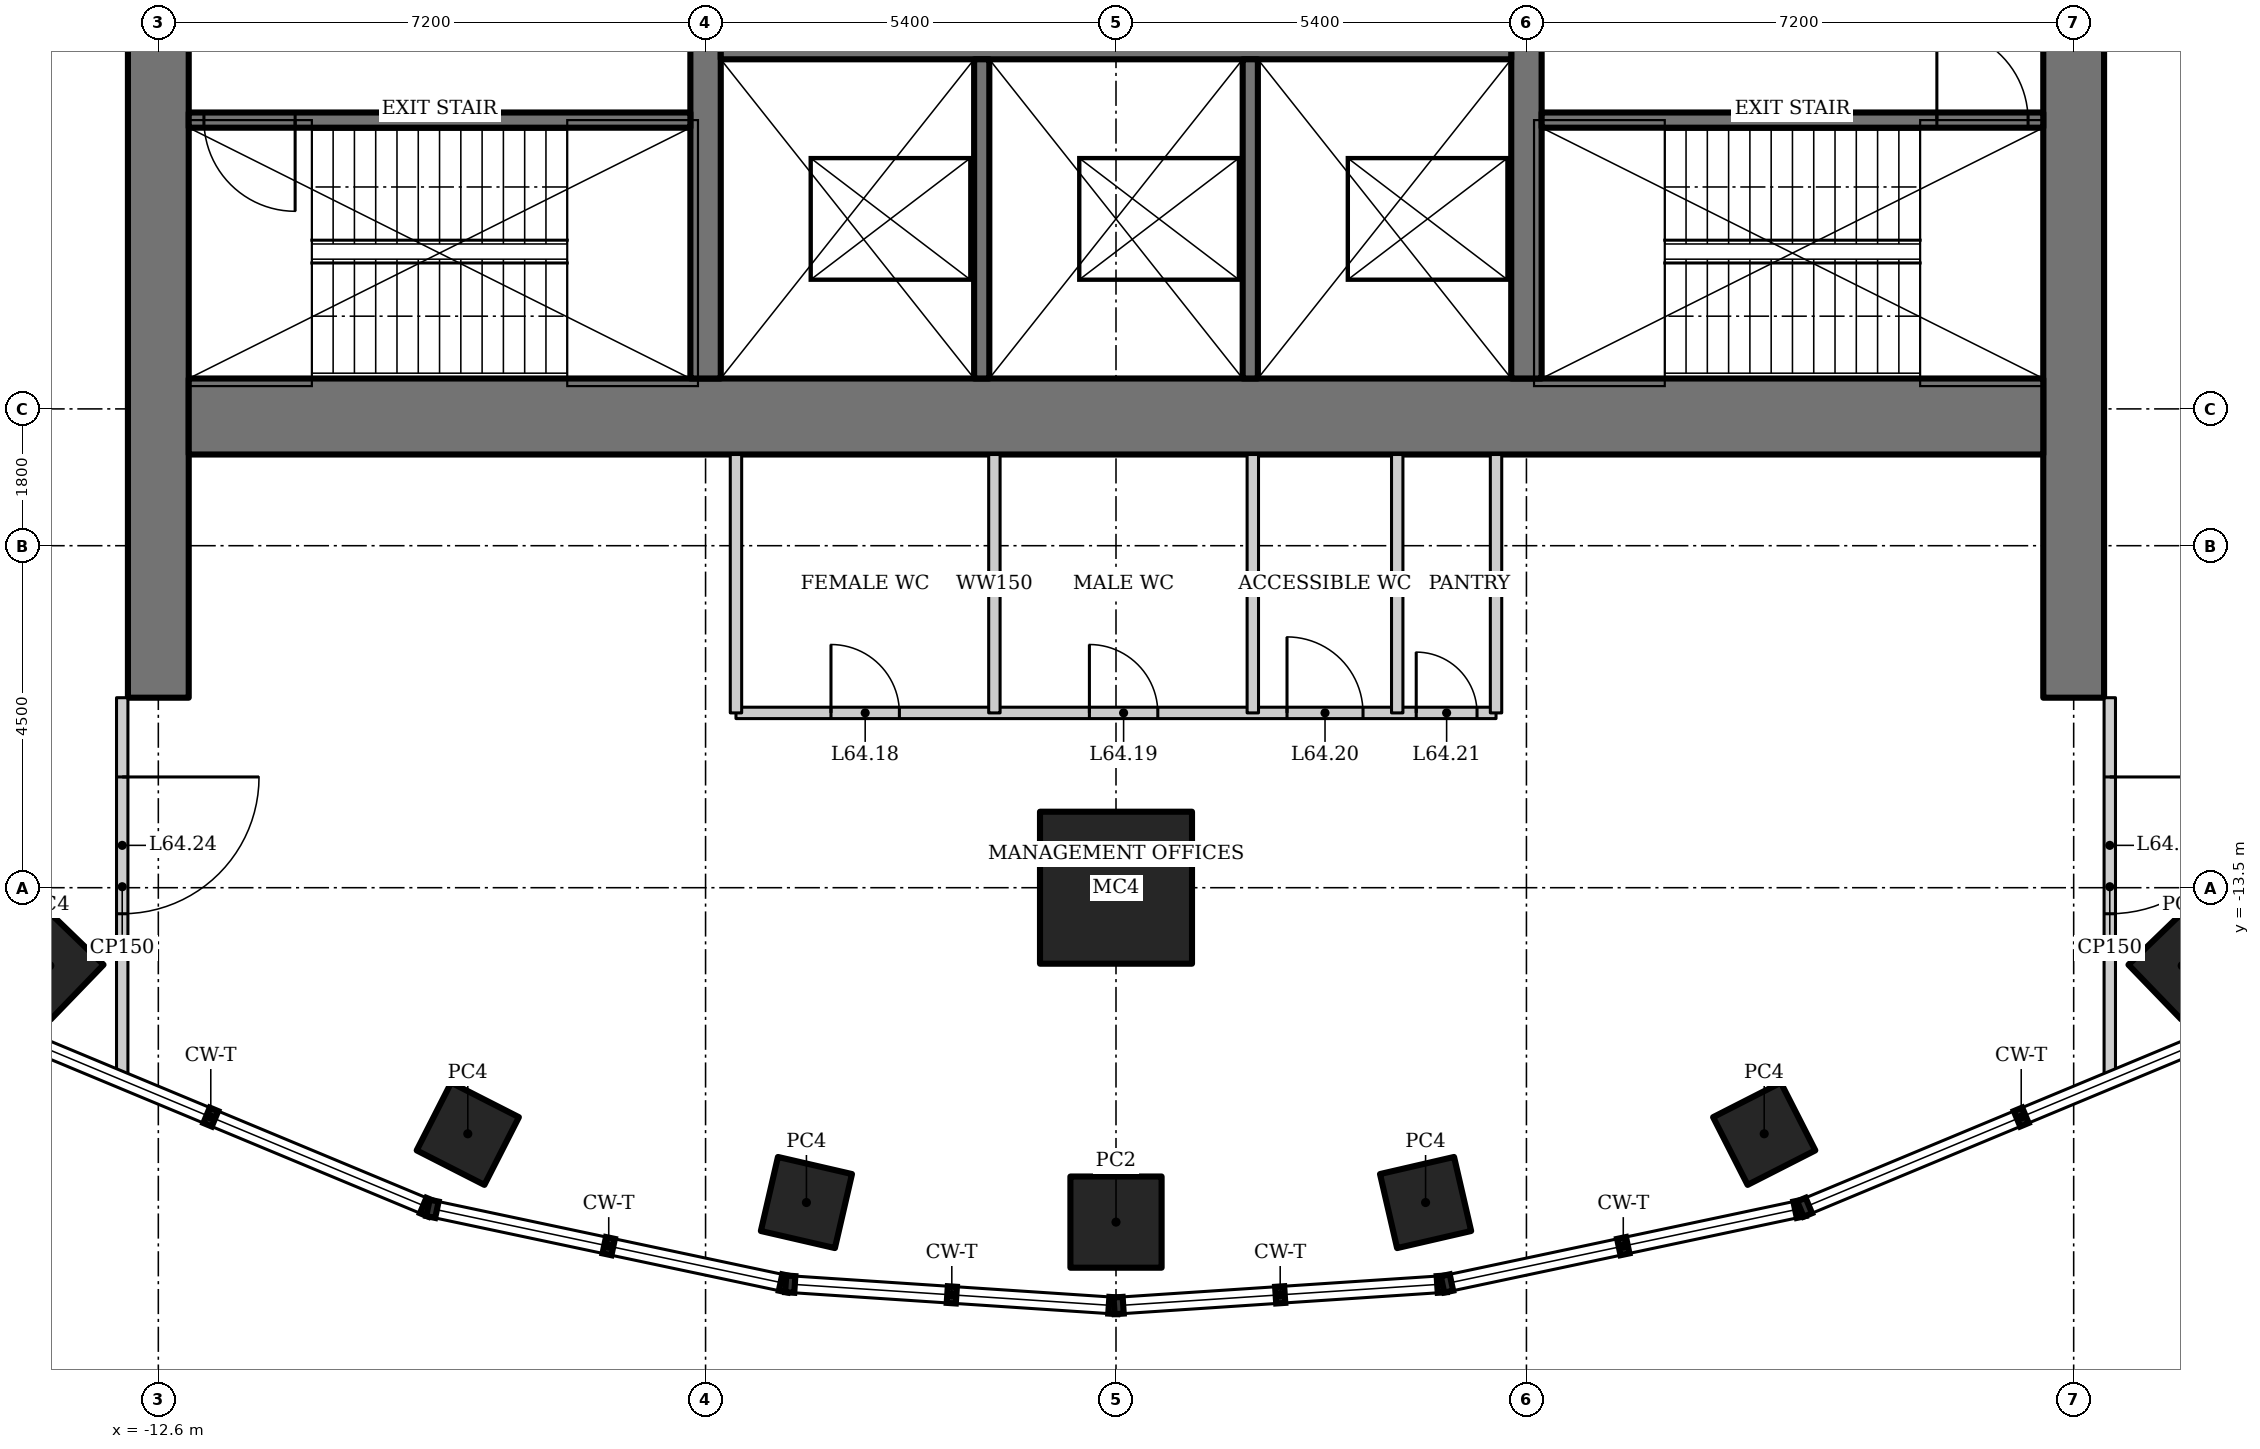
"""IFC4 building model, lengths in metres.
Left out: names, types, materials, properties, quantities, classifications, styles, units other than length and angle.
Written with IfcOpenShell. Run it as: python <this file> out.ifc"""

import sys

from ifc_helpers import new_model, si_unit, direction, frame, frame_2d, origin, origin_2d, place, context, subcontext, project, spatial, rectangle, hollow_rectangle, extrude, element, fill, save


model = new_model("IFC4")
c1 = context("Model", 3, precision=1e-05, world=origin(), true_north=direction((0.0, 1.0)))
c2 = subcontext(c1, "Body", "Model", "MODEL_VIEW")
j1 = project(units=[si_unit("LENGTHUNIT", "METRE"), si_unit("PLANEANGLEUNIT", "RADIAN")], contexts=[c1])
p1 = place(None, origin())
s1 = spatial("IfcSite", under=j1, at=p1, CompositionType="ELEMENT")
p2 = place(p1, origin())
s2 = spatial("IfcBuilding", under=s1, at=p2, CompositionType="ELEMENT")
p3 = place(p2, frame((0.0, 0.0, 274.9)))
s3 = spatial("IfcBuildingStorey", under=s2, at=p3, CompositionType="ELEMENT", Elevation=274.9)
p4 = place(p3, frame((0.0, -13.5, 0.0), z_axis=(0.0, 0.0, 1.0), x_axis=(1.0, 0.0, 0.0)))
e1 = element("IfcColumn", 1, at=p4, inside=s3, PredefinedType="COLUMN", context=c2, shape_type="SweptSolid", body=[
    extrude(hollow_rectangle(XDim=2.0, YDim=2.0, WallThickness=0.15, at=origin_2d()), origin(), (0.0, 0.0, 1.0), 4.5),
])
for number, where, z_axis, x_axis in (
    (2, (-14.028, -14.526, 0.0), (0.0, 0.0, 1.0), (0.695, 0.719, 0.0)),
    (3, (-8.528, -16.738, 0.0), (0.0, 0.0, 1.0), (0.454, 0.891, 0.0)),
    (4, (-4.073, -17.642, 0.0), (0.0, 0.0, 1.0), (0.225, 0.974, 0.0)),
):
    element("IfcColumn", number, at=place(p3, frame(where, z_axis=z_axis, x_axis=x_axis)), inside=s3, PredefinedType="COLUMN", context=c2, shape_type="SweptSolid", body=[
        extrude(hollow_rectangle(XDim=1.0, YDim=1.0, WallThickness=0.08, at=origin_2d()), origin(), (0.0, 0.0, 1.0), 4.5),
    ])
p5 = place(p3, frame((0.0, -17.9, 0.0), z_axis=(0.0, 0.0, 1.0), x_axis=(1.0, 0.0, 0.0)))
e5 = element("IfcColumn", 5, at=p5, inside=s3, PredefinedType="COLUMN", context=c2, shape_type="SweptSolid", body=[
    extrude(hollow_rectangle(XDim=1.2, YDim=1.2, WallThickness=0.1, at=origin_2d()), origin(), (0.0, 0.0, 1.0), 4.5),
])
for number, where, z_axis, x_axis in (
    (6, (4.073, -17.642, 0.0), (0.0, 0.0, 1.0), (0.974, 0.225, 0.0)),
    (7, (8.528, -16.738, 0.0), (0.0, 0.0, 1.0), (0.891, 0.454, 0.0)),
    (8, (14.028, -14.526, 0.0), (0.0, 0.0, 1.0), (0.719, 0.695, 0.0)),
):
    element("IfcColumn", number, at=place(p3, frame(where, z_axis=z_axis, x_axis=x_axis)), inside=s3, PredefinedType="COLUMN", context=c2, shape_type="SweptSolid", body=[
        extrude(hollow_rectangle(XDim=1.0, YDim=1.0, WallThickness=0.08, at=origin_2d()), origin(), (0.0, 0.0, 1.0), 4.5),
    ])
p6 = place(p3, frame((12.6, -11.0, 0.0), z_axis=(0.0, 0.0, 1.0), x_axis=(0.0, 1.0, 0.0)))
e9 = element("IfcWall", 9, at=p6, inside=s3, PredefinedType="SHEAR", context=c2, shape_type="SweptSolid", body=[
    extrude(rectangle(XDim=22.0, YDim=0.8, at=frame_2d((11.0, 0.0))), origin(), (0.0, 0.0, 1.0), 4.5),
])
p7 = place(p6, frame((10.1, 0.0, 0.0)))
e10 = element("IfcOpeningElement", 10, at=p7, cuts=e9, PredefinedType="OPENING", context=c2, shape_type="SweptSolid", body=[
    extrude(rectangle(XDim=1.8, YDim=2.1, at=frame_2d((0.9, 1.05))), frame((0.0, 0.41, 0.0), z_axis=(0.0, -1.0, 0.0), x_axis=(1.0, 0.0, 0.0)), (0.0, 0.0, 1.0), 0.82),
])
p8 = place(p3, frame((-12.6, 11.0, 0.0), z_axis=(0.0, 0.0, 1.0), x_axis=(0.0, -1.0, 0.0)))
e11 = element("IfcWall", 11, at=p8, inside=s3, PredefinedType="SHEAR", context=c2, shape_type="SweptSolid", body=[
    extrude(rectangle(XDim=22.0, YDim=0.8, at=frame_2d((11.0, 0.0))), origin(), (0.0, 0.0, 1.0), 4.5),
])
p9 = place(p8, frame((10.1, 0.0, 0.0)))
e12 = element("IfcOpeningElement", 12, at=p9, cuts=e11, PredefinedType="OPENING", context=c2, shape_type="SweptSolid", body=[
    extrude(rectangle(XDim=1.8, YDim=2.1, at=frame_2d((0.9, 1.05))), frame((0.0, 0.41, 0.0), z_axis=(0.0, -1.0, 0.0), x_axis=(1.0, 0.0, 0.0)), (0.0, 0.0, 1.0), 0.82),
])
p10 = place(p3, frame((-12.2, -7.3, 0.0), z_axis=(0.0, 0.0, 1.0), x_axis=(1.0, 0.0, 0.0)))
e13 = element("IfcWall", 13, at=p10, inside=s3, PredefinedType="SHEAR", context=c2, shape_type="SweptSolid", body=[
    extrude(rectangle(XDim=24.4, YDim=1.0, at=frame_2d((12.2, 0.0))), origin(), (0.0, 0.0, 1.0), 4.5),
])
p11 = place(p3, frame((5.4, -6.8, 0.0), z_axis=(0.0, 0.0, 1.0), x_axis=(0.0, 1.0, 0.0)))
e14 = element("IfcWall", 14, at=p11, inside=s3, PredefinedType="SHEAR", context=c2, shape_type="SweptSolid", body=[
    extrude(rectangle(XDim=14.6, YDim=0.4, at=frame_2d((7.3, 0.0))), origin(), (0.0, 0.0, 1.0), 4.5),
])
p12 = place(p11, frame((5.9, 0.0, 0.0)))
e15 = element("IfcOpeningElement", 15, at=p12, cuts=e14, PredefinedType="OPENING", context=c2, shape_type="SweptSolid", body=[
    extrude(rectangle(XDim=1.8, YDim=2.1, at=frame_2d((0.9, 1.05))), frame((0.0, 0.21, 0.0), z_axis=(0.0, -1.0, 0.0), x_axis=(1.0, 0.0, 0.0)), (0.0, 0.0, 1.0), 0.42),
])
p13 = place(p3, frame((-5.4, 7.8, 0.0), z_axis=(0.0, 0.0, 1.0), x_axis=(0.0, -1.0, 0.0)))
e16 = element("IfcWall", 16, at=p13, inside=s3, PredefinedType="SHEAR", context=c2, shape_type="SweptSolid", body=[
    extrude(rectangle(XDim=14.6, YDim=0.4, at=frame_2d((7.3, 0.0))), origin(), (0.0, 0.0, 1.0), 4.5),
])
p14 = place(p13, frame((6.4, 0.0, 0.0)))
e17 = element("IfcOpeningElement", 17, at=p14, cuts=e16, PredefinedType="OPENING", context=c2, shape_type="SweptSolid", body=[
    extrude(rectangle(XDim=1.8, YDim=2.1, at=frame_2d((0.9, 1.05))), frame((0.0, 0.21, 0.0), z_axis=(0.0, -1.0, 0.0), x_axis=(1.0, 0.0, 0.0)), (0.0, 0.0, 1.0), 0.42),
])
p15 = place(p3, frame((-5.2, -2.4, 0.0), z_axis=(0.0, 0.0, 1.0), x_axis=(1.0, 0.0, 0.0)))
e18 = element("IfcWall", 18, at=p15, inside=s3, PredefinedType="SHEAR", context=c2, shape_type="SweptSolid", body=[
    extrude(rectangle(XDim=10.4, YDim=0.4, at=frame_2d((5.2, 0.0))), origin(), (0.0, 0.0, 1.0), 4.5),
])
p16 = place(p15, frame((1.683, 0.0, 0.0)))
e19 = element("IfcOpeningElement", 19, at=p16, cuts=e18, PredefinedType="OPENING", context=c2, shape_type="SweptSolid", body=[
    extrude(rectangle(XDim=1.1, YDim=2.2, at=frame_2d((0.55, 1.1))), frame((0.0, 0.21, 0.0), z_axis=(0.0, -1.0, 0.0), x_axis=(1.0, 0.0, 0.0)), (0.0, 0.0, 1.0), 0.42),
])
p17 = place(p15, frame((5.217, 0.0, 0.0)))
e20 = element("IfcOpeningElement", 20, at=p17, cuts=e18, PredefinedType="OPENING", context=c2, shape_type="SweptSolid", body=[
    extrude(rectangle(XDim=1.1, YDim=2.2, at=frame_2d((0.55, 1.1))), frame((0.0, 0.21, 0.0), z_axis=(0.0, -1.0, 0.0), x_axis=(1.0, 0.0, 0.0)), (0.0, 0.0, 1.0), 0.42),
])
p18 = place(p15, frame((8.75, 0.0, 0.0)))
e21 = element("IfcOpeningElement", 21, at=p18, cuts=e18, PredefinedType="OPENING", context=c2, shape_type="SweptSolid", body=[
    extrude(rectangle(XDim=1.1, YDim=2.2, at=frame_2d((0.55, 1.1))), frame((0.0, 0.21, 0.0), z_axis=(0.0, -1.0, 0.0), x_axis=(1.0, 0.0, 0.0)), (0.0, 0.0, 1.0), 0.42),
])
for number, where, z_axis, x_axis in (
    (22, (-1.767, -2.6, 0.0), (0.0, 0.0, 1.0), (0.0, -1.0, 0.0)),
    (23, (1.767, -2.6, 0.0), (0.0, 0.0, 1.0), (0.0, -1.0, 0.0)),
):
    element("IfcWall", number, at=place(p3, frame(where, z_axis=z_axis, x_axis=x_axis)), inside=s3, PredefinedType="SOLIDWALL", context=c2, shape_type="SweptSolid", body=[
        extrude(rectangle(XDim=4.2, YDim=0.2, at=frame_2d((2.1, 0.0))), origin(), (0.0, 0.0, 1.0), 4.5),
    ])
p19 = place(p3, frame((5.6, -3.4, 0.0), z_axis=(0.0, 0.0, 1.0), x_axis=(1.0, 0.0, 0.0)))
e24 = element("IfcWall", 24, at=p19, inside=s3, PredefinedType="SHEAR", context=c2, shape_type="SweptSolid", body=[
    extrude(rectangle(XDim=6.6, YDim=0.2, at=frame_2d((3.3, 0.0))), origin(), (0.0, 0.0, 1.0), 4.5),
])
p20 = place(p19, frame((5.2, 0.0, 0.0)))
e25 = element("IfcOpeningElement", 25, at=p20, cuts=e24, PredefinedType="OPENING", context=c2, shape_type="SweptSolid", body=[
    extrude(rectangle(XDim=1.2, YDim=2.1, at=frame_2d((0.6, 1.05))), frame((0.0, 0.11, 0.0), z_axis=(0.0, -1.0, 0.0), x_axis=(1.0, 0.0, 0.0)), (0.0, 0.0, 1.0), 0.22),
])
p21 = place(p3, frame((-5.6, -3.4, 0.0), z_axis=(0.0, 0.0, 1.0), x_axis=(-1.0, 0.0, 0.0)))
e26 = element("IfcWall", 26, at=p21, inside=s3, PredefinedType="SHEAR", context=c2, shape_type="SweptSolid", body=[
    extrude(rectangle(XDim=6.6, YDim=0.2, at=frame_2d((3.3, 0.0))), origin(), (0.0, 0.0, 1.0), 4.5),
])
p22 = place(p21, frame((5.2, 0.0, 0.0)))
e27 = element("IfcOpeningElement", 27, at=p22, cuts=e26, PredefinedType="OPENING", context=c2, shape_type="SweptSolid", body=[
    extrude(rectangle(XDim=1.2, YDim=2.1, at=frame_2d((0.6, 1.05))), frame((0.0, 0.11, 0.0), z_axis=(0.0, -1.0, 0.0), x_axis=(1.0, 0.0, 0.0)), (0.0, 0.0, 1.0), 0.22),
])
p23 = place(p3, frame((-13.075, -11.0, 0.0), z_axis=(0.0, 0.0, 1.0), x_axis=(0.0, -1.0, 0.0)))
e28 = element("IfcWall", 28, at=p23, inside=s3, PredefinedType="PARTITIONING", context=c2, shape_type="SweptSolid", body=[
    extrude(rectangle(XDim=4.974, YDim=0.15, at=frame_2d((2.487, 0.0))), origin(), (0.0, 0.0, 1.0), 4.35),
])
p24 = place(p23, frame((1.043, 0.0, 0.0)))
e29 = element("IfcOpeningElement", 29, at=p24, cuts=e28, PredefinedType="OPENING", context=c2, shape_type="SweptSolid", body=[
    extrude(rectangle(XDim=1.8, YDim=2.1, at=frame_2d((0.9, 1.05))), frame((0.0, 0.085, 0.0), z_axis=(0.0, -1.0, 0.0), x_axis=(1.0, 0.0, 0.0)), (0.0, 0.0, 1.0), 0.17),
])
p25 = place(p3, frame((13.075, -11.0, 0.0), z_axis=(0.0, 0.0, 1.0), x_axis=(0.0, -1.0, 0.0)))
e30 = element("IfcWall", 30, at=p25, inside=s3, PredefinedType="PARTITIONING", context=c2, shape_type="SweptSolid", body=[
    extrude(rectangle(XDim=4.974, YDim=0.15, at=frame_2d((2.487, 0.0))), origin(), (0.0, 0.0, 1.0), 4.35),
])
p26 = place(p25, frame((1.043, 0.0, 0.0)))
e31 = element("IfcOpeningElement", 31, at=p26, cuts=e30, PredefinedType="OPENING", context=c2, shape_type="SweptSolid", body=[
    extrude(rectangle(XDim=1.8, YDim=2.1, at=frame_2d((0.9, 1.05))), frame((0.0, 0.085, 0.0), z_axis=(0.0, -1.0, 0.0), x_axis=(1.0, 0.0, 0.0)), (0.0, 0.0, 1.0), 0.17),
])
p27 = place(p3, frame((-5.0, -11.2, 0.0), z_axis=(0.0, 0.0, 1.0), x_axis=(1.0, 0.0, 0.0)))
e32 = element("IfcWall", 32, at=p27, inside=s3, PredefinedType="SOLIDWALL", context=c2, shape_type="SweptSolid", body=[
    extrude(rectangle(XDim=10.0, YDim=0.15, at=frame_2d((5.0, 0.0))), origin(), (0.0, 0.0, 1.0), 4.35),
])
p28 = place(p27, frame((1.25, 0.0, 0.0)))
e33 = element("IfcOpeningElement", 33, at=p28, cuts=e32, PredefinedType="OPENING", context=c2, shape_type="SweptSolid", body=[
    extrude(rectangle(XDim=0.9, YDim=2.1, at=frame_2d((0.45, 1.05))), frame((0.0, 0.085, 0.0), z_axis=(0.0, -1.0, 0.0), x_axis=(1.0, 0.0, 0.0)), (0.0, 0.0, 1.0), 0.17),
])
p29 = place(p27, frame((4.65, 0.0, 0.0)))
e34 = element("IfcOpeningElement", 34, at=p29, cuts=e32, PredefinedType="OPENING", context=c2, shape_type="SweptSolid", body=[
    extrude(rectangle(XDim=0.9, YDim=2.1, at=frame_2d((0.45, 1.05))), frame((0.0, 0.085, 0.0), z_axis=(0.0, -1.0, 0.0), x_axis=(1.0, 0.0, 0.0)), (0.0, 0.0, 1.0), 0.17),
])
p30 = place(p27, frame((7.25, 0.0, 0.0)))
e35 = element("IfcOpeningElement", 35, at=p30, cuts=e32, PredefinedType="OPENING", context=c2, shape_type="SweptSolid", body=[
    extrude(rectangle(XDim=1.0, YDim=2.1, at=frame_2d((0.5, 1.05))), frame((0.0, 0.085, 0.0), z_axis=(0.0, -1.0, 0.0), x_axis=(1.0, 0.0, 0.0)), (0.0, 0.0, 1.0), 0.17),
])
p31 = place(p27, frame((8.95, 0.0, 0.0)))
e36 = element("IfcOpeningElement", 36, at=p31, cuts=e32, PredefinedType="OPENING", context=c2, shape_type="SweptSolid", body=[
    extrude(rectangle(XDim=0.8, YDim=2.1, at=frame_2d((0.4, 1.05))), frame((0.0, 0.085, 0.0), z_axis=(0.0, -1.0, 0.0), x_axis=(1.0, 0.0, 0.0)), (0.0, 0.0, 1.0), 0.17),
])
for number, where, z_axis, x_axis in (
    (37, (-5.0, -7.8, 0.0), (0.0, 0.0, 1.0), (0.0, -1.0, 0.0)),
    (38, (5.0, -7.8, 0.0), (0.0, 0.0, 1.0), (0.0, -1.0, 0.0)),
    (39, (-1.6, -7.8, 0.0), (0.0, 0.0, 1.0), (0.0, -1.0, 0.0)),
):
    element("IfcWall", number, at=place(p3, frame(where, z_axis=z_axis, x_axis=x_axis)), inside=s3, PredefinedType="SOLIDWALL", context=c2, shape_type="SweptSolid", body=[
        extrude(rectangle(XDim=3.4, YDim=0.15, at=frame_2d((1.7, 0.0))), origin(), (0.0, 0.0, 1.0), 4.35),
    ])
p32 = place(p3, frame((1.8, -7.8, 0.0), z_axis=(0.0, 0.0, 1.0), x_axis=(0.0, -1.0, 0.0)))
e40 = element("IfcWall", 40, at=p32, inside=s3, PredefinedType="SOLIDWALL", context=c2, shape_type="SweptSolid", body=[
    extrude(rectangle(XDim=3.4, YDim=0.15, at=frame_2d((1.7, 0.0))), origin(), (0.0, 0.0, 1.0), 3.593),
])
p33 = place(p3, frame((3.7, -7.8, 0.0), z_axis=(0.0, 0.0, 1.0), x_axis=(0.0, -1.0, 0.0)))
e41 = element("IfcWall", 41, at=p33, inside=s3, PredefinedType="SOLIDWALL", context=c2, shape_type="SweptSolid", body=[
    extrude(rectangle(XDim=3.4, YDim=0.15, at=frame_2d((1.7, 0.0))), origin(), (0.0, 0.0, 1.0), 4.35),
])
p34 = place(p20, origin())
e42 = element("IfcDoor", 42, at=p34, inside=s3, OperationType="SINGLE_SWING_RIGHT", PredefinedType="DOOR", context=c2, shape_type="SweptSolid", body=[
    extrude(rectangle(XDim=1.2, YDim=2.1, at=frame_2d((0.6, 1.05))), frame((0.0, 0.025, 0.0), z_axis=(0.0, -1.0, 0.0), x_axis=(1.0, 0.0, 0.0)), (0.0, 0.0, 1.0), 0.05),
])
fill(e25, e42)
p35 = place(p22, origin())
e43 = element("IfcDoor", 43, at=p35, inside=s3, OperationType="SINGLE_SWING_RIGHT", PredefinedType="DOOR", context=c2, shape_type="SweptSolid", body=[
    extrude(rectangle(XDim=1.2, YDim=2.1, at=frame_2d((0.6, 1.05))), frame((0.0, 0.025, 0.0), z_axis=(0.0, -1.0, 0.0), x_axis=(1.0, 0.0, 0.0)), (0.0, 0.0, 1.0), 0.05),
])
fill(e27, e43)
p36 = place(p28, origin())
e44 = element("IfcDoor", 44, at=p36, inside=s3, OperationType="SINGLE_SWING_LEFT", PredefinedType="DOOR", context=c2, shape_type="SweptSolid", body=[
    extrude(rectangle(XDim=0.9, YDim=2.1, at=frame_2d((0.45, 1.05))), frame((0.0, 0.025, 0.0), z_axis=(0.0, -1.0, 0.0), x_axis=(1.0, 0.0, 0.0)), (0.0, 0.0, 1.0), 0.05),
])
fill(e33, e44)
p37 = place(p29, origin())
e45 = element("IfcDoor", 45, at=p37, inside=s3, OperationType="SINGLE_SWING_LEFT", PredefinedType="DOOR", context=c2, shape_type="SweptSolid", body=[
    extrude(rectangle(XDim=0.9, YDim=2.1, at=frame_2d((0.45, 1.05))), frame((0.0, 0.025, 0.0), z_axis=(0.0, -1.0, 0.0), x_axis=(1.0, 0.0, 0.0)), (0.0, 0.0, 1.0), 0.05),
])
fill(e34, e45)
p38 = place(p30, origin())
e46 = element("IfcDoor", 46, at=p38, inside=s3, OperationType="SINGLE_SWING_LEFT", PredefinedType="DOOR", context=c2, shape_type="SweptSolid", body=[
    extrude(rectangle(XDim=1.0, YDim=2.1, at=frame_2d((0.5, 1.05))), frame((0.0, 0.025, 0.0), z_axis=(0.0, -1.0, 0.0), x_axis=(1.0, 0.0, 0.0)), (0.0, 0.0, 1.0), 0.05),
])
fill(e35, e46)
p39 = place(p31, origin())
e47 = element("IfcDoor", 47, at=p39, inside=s3, OperationType="SINGLE_SWING_LEFT", PredefinedType="DOOR", context=c2, shape_type="SweptSolid", body=[
    extrude(rectangle(XDim=0.8, YDim=2.1, at=frame_2d((0.4, 1.05))), frame((0.0, 0.025, 0.0), z_axis=(0.0, -1.0, 0.0), x_axis=(1.0, 0.0, 0.0)), (0.0, 0.0, 1.0), 0.05),
])
fill(e36, e47)
p40 = place(p24, origin())
e48 = element("IfcDoor", 48, at=p40, inside=s3, OperationType="DOUBLE_DOOR_DOUBLE_SWING", PredefinedType="DOOR", context=c2, shape_type="SweptSolid", body=[
    extrude(rectangle(XDim=1.8, YDim=2.1, at=frame_2d((0.9, 1.05))), frame((0.0, 0.025, 0.0), z_axis=(0.0, -1.0, 0.0), x_axis=(1.0, 0.0, 0.0)), (0.0, 0.0, 1.0), 0.05),
])
fill(e29, e48)
p41 = place(p26, origin())
e49 = element("IfcDoor", 49, at=p41, inside=s3, OperationType="DOUBLE_DOOR_DOUBLE_SWING", PredefinedType="DOOR", context=c2, shape_type="SweptSolid", body=[
    extrude(rectangle(XDim=1.8, YDim=2.1, at=frame_2d((0.9, 1.05))), frame((0.0, 0.025, 0.0), z_axis=(0.0, -1.0, 0.0), x_axis=(1.0, 0.0, 0.0)), (0.0, 0.0, 1.0), 0.05),
])
fill(e31, e49)
save(model, sys.argv[1])
